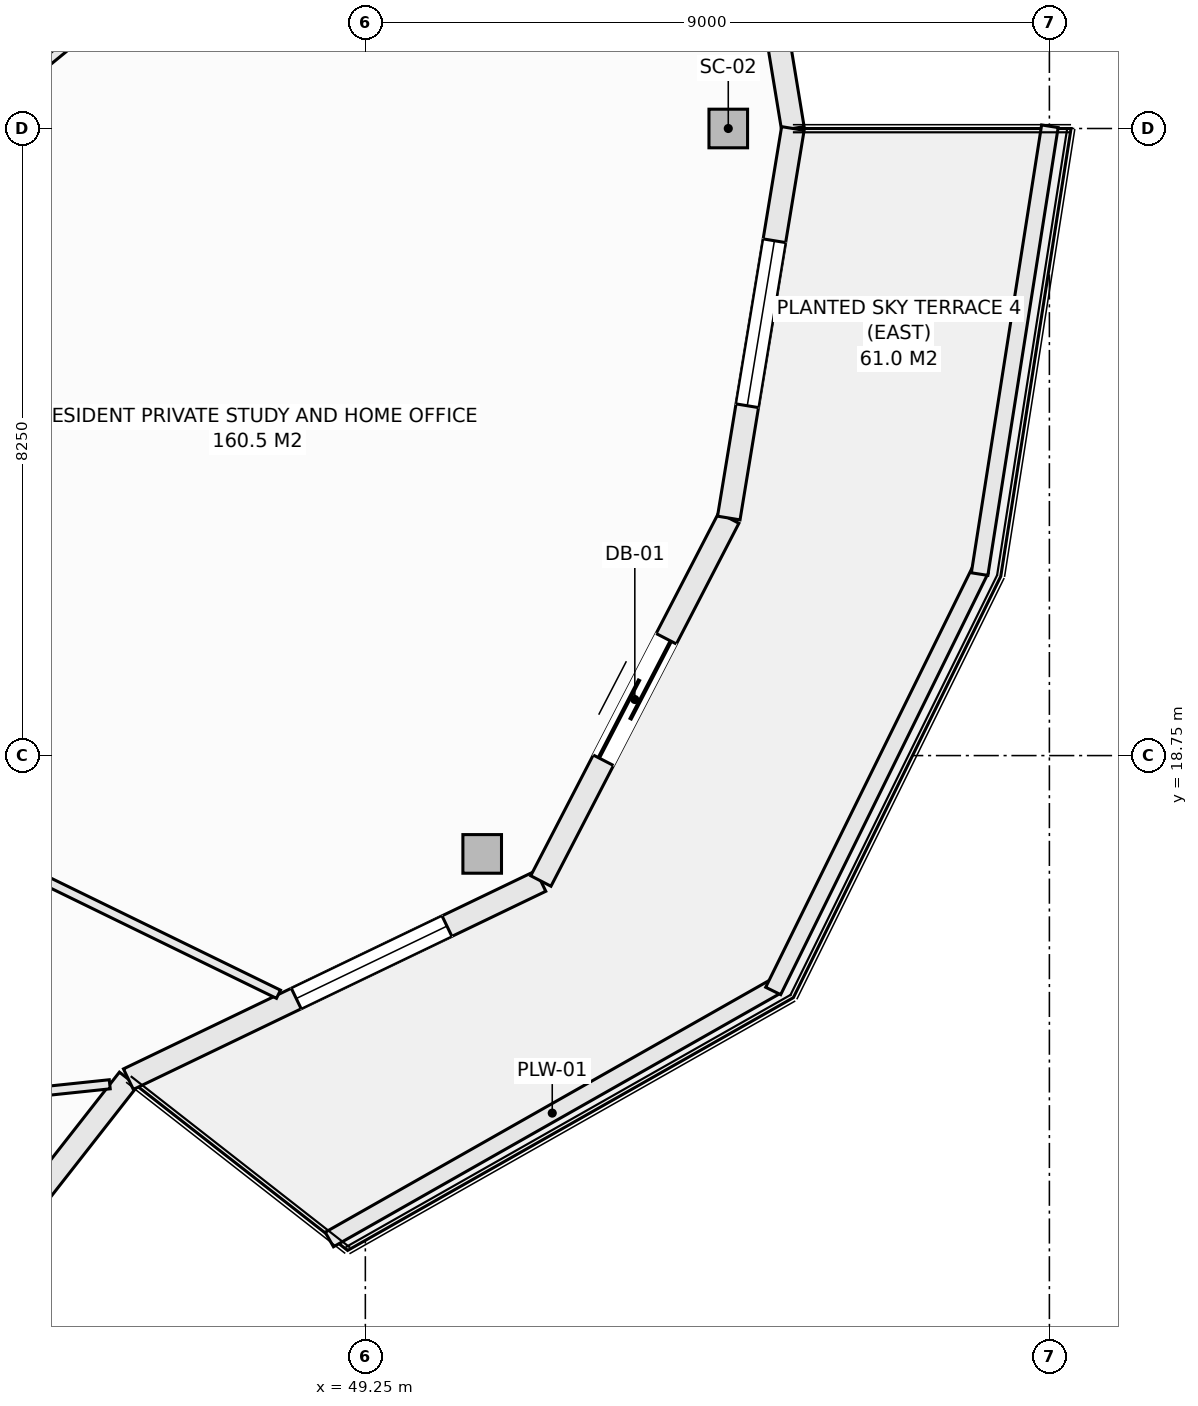
"""IFC4 building model, lengths in metres.
Left out: names, types, materials, properties, quantities, classifications, styles, units other than length and angle.
Written with IfcOpenShell. Run it as: python <this file> out.ifc"""

import sys

from ifc_helpers import new_model, si_unit, direction, frame, frame_2d, origin, origin_2d, place, context, subcontext, project, spatial, rectangle, hollow_rectangle, extrude, element, fill, save


model = new_model("IFC4")
c1 = context("Model", 3, precision=1e-05, world=origin(), true_north=direction((0.0, 1.0)))
c2 = subcontext(c1, "Body", "Model", "MODEL_VIEW")
j1 = project(units=[si_unit("LENGTHUNIT", "METRE"), si_unit("PLANEANGLEUNIT", "RADIAN")], contexts=[c1])
p1 = place(None, origin())
s1 = spatial("IfcSite", under=j1, at=p1, CompositionType="ELEMENT")
p2 = place(p1, origin())
s2 = spatial("IfcBuilding", under=s1, at=p2, CompositionType="ELEMENT")
p3 = place(p2, frame((0.0, 0.0, 216.2)))
s3 = spatial("IfcBuildingStorey", under=s2, at=p3, CompositionType="ELEMENT", Elevation=216.2)
for number, where, z_axis, x_axis in (
    (1, (54.025, 27.0, -0.27), (0.0, 0.0, 1.0), (1.0, 0.0, 0.0)),
    (2, (50.787, 17.456, -0.27), (0.0, 0.0, 1.0), (1.0, 0.0, 0.0)),
):
    element("IfcColumn", number, at=place(p3, frame(where, z_axis=z_axis, x_axis=x_axis)), inside=s3, PredefinedType="COLUMN", context=c2, shape_type="SweptSolid", body=[
        extrude(hollow_rectangle(XDim=0.508, YDim=0.508, WallThickness=0.019, at=origin_2d()), origin(), (0.0, 0.0, 1.0), 3.3),
    ])
p4 = place(p3, frame((54.032, 32.125, 0.0), z_axis=(0.0, 0.0, 1.0), x_axis=(0.16237087798, -0.986729799886, 0.0)))
e3 = element("IfcWall", 3, at=p4, inside=s3, PredefinedType="SOLIDWALL", context=c2, shape_type="SweptSolid", body=[
    extrude(rectangle(XDim=5.193, YDim=0.3, at=frame_2d((2.597, 0.0))), origin(), (0.0, 0.0, 1.0), 2.605),
])
p5 = place(p4, frame((1.497, 0.0, 0.72)))
e4 = element("IfcOpeningElement", 4, at=p5, cuts=e3, PredefinedType="OPENING", context=c2, shape_type="SweptSolid", body=[
    extrude(rectangle(XDim=2.2, YDim=1.65, at=frame_2d((1.1, 0.825))), frame((0.0, 0.16, 0.0), z_axis=(0.0, -1.0, 0.0), x_axis=(1.0, 0.0, 0.0)), (0.0, 0.0, 1.0), 0.32),
])
p6 = place(p3, frame((42.5, 9.853, 0.0), z_axis=(0.0, 0.0, 1.0), x_axis=(0.616450126935, 0.787393955401, 0.0)))
e5 = element("IfcWall", 5, at=p6, inside=s3, PredefinedType="SOLIDWALL", context=c2, shape_type="SweptSolid", body=[
    extrude(rectangle(XDim=5.893, YDim=0.3, at=frame_2d((2.946, 0.0))), origin(), (0.0, 0.0, 1.0), 2.605),
])
p7 = place(p6, frame((1.846, 0.0, 0.72)))
e6 = element("IfcOpeningElement", 6, at=p7, cuts=e5, PredefinedType="OPENING", context=c2, shape_type="SweptSolid", body=[
    extrude(rectangle(XDim=2.2, YDim=1.65, at=frame_2d((1.1, 0.825))), frame((0.0, 0.16, 0.0), z_axis=(0.0, -1.0, 0.0), x_axis=(1.0, 0.0, 0.0)), (0.0, 0.0, 1.0), 0.32),
])
p8 = place(p3, frame((46.133, 14.493, 0.0), z_axis=(0.0, 0.0, 1.0), x_axis=(0.901348331142, 0.433094892545, 0.0)))
e7 = element("IfcWall", 7, at=p8, inside=s3, PredefinedType="SOLIDWALL", context=c2, shape_type="SweptSolid", body=[
    extrude(rectangle(XDim=6.021, YDim=0.3, at=frame_2d((3.01, 0.0))), origin(), (0.0, 0.0, 1.0), 2.605),
])
p9 = place(p8, frame((2.45, 0.0, 0.72)))
e8 = element("IfcOpeningElement", 8, at=p9, cuts=e7, PredefinedType="OPENING", context=c2, shape_type="SweptSolid", body=[
    extrude(rectangle(XDim=2.2, YDim=1.65, at=frame_2d((1.1, 0.825))), frame((0.0, 0.16, 0.0), z_axis=(0.0, -1.0, 0.0), x_axis=(1.0, 0.0, 0.0)), (0.0, 0.0, 1.0), 0.32),
])
p10 = place(p3, frame((51.559, 17.1, 0.0), z_axis=(0.0, 0.0, 1.0), x_axis=(0.459808219482, 0.888018243786, 0.0)))
e9 = element("IfcWall", 9, at=p10, inside=s3, PredefinedType="SOLIDWALL", context=c2, shape_type="SweptSolid", body=[
    extrude(rectangle(XDim=5.378, YDim=0.3, at=frame_2d((2.689, 0.0))), origin(), (0.0, 0.0, 1.0), 2.605),
])
p11 = place(p10, frame((1.789, 0.0, 0.0)))
e10 = element("IfcOpeningElement", 10, at=p11, cuts=e9, PredefinedType="OPENING", context=c2, shape_type="SweptSolid", body=[
    extrude(rectangle(XDim=1.8, YDim=2.25, at=frame_2d((0.9, 1.125))), frame((0.0, 0.16, 0.0), z_axis=(0.0, -1.0, 0.0), x_axis=(1.0, 0.0, 0.0)), (0.0, 0.0, 1.0), 0.32),
])
p12 = place(p3, frame((54.032, 21.875, 0.0), z_axis=(0.0, 0.0, 1.0), x_axis=(0.16237087798, 0.986729799886, 0.0)))
e11 = element("IfcWall", 11, at=p12, inside=s3, PredefinedType="SOLIDWALL", context=c2, shape_type="SweptSolid", body=[
    extrude(rectangle(XDim=5.193, YDim=0.3, at=frame_2d((2.597, 0.0))), origin(), (0.0, 0.0, 1.0), 2.605),
])
p13 = place(p12, frame((1.497, 0.0, 0.72)))
e12 = element("IfcOpeningElement", 12, at=p13, cuts=e11, PredefinedType="OPENING", context=c2, shape_type="SweptSolid", body=[
    extrude(rectangle(XDim=2.2, YDim=1.65, at=frame_2d((1.1, 0.825))), frame((0.0, 0.16, 0.0), z_axis=(0.0, -1.0, 0.0), x_axis=(1.0, 0.0, 0.0)), (0.0, 0.0, 1.0), 0.32),
])
p14 = place(p3, frame((48.776, 12.383, 0.0), z_axis=(0.0, 0.0, 1.0), x_axis=(0.869860619267, 0.493297580623, 0.0)))
e13 = element("IfcWall", 13, at=p14, inside=s3, PredefinedType="PARAPET", context=c2, shape_type="SweptSolid", body=[
    extrude(rectangle(XDim=6.743, YDim=0.22, at=frame_2d((3.371, 0.0))), origin(), (0.0, 0.0, 1.0), 0.52),
])
p15 = place(p3, frame((54.616, 15.653, 0.0), z_axis=(0.0, 0.0, 1.0), x_axis=(0.441640961804, 0.897191875162, 0.0)))
e14 = element("IfcWall", 14, at=p15, inside=s3, PredefinedType="PARAPET", context=c2, shape_type="SweptSolid", body=[
    extrude(rectangle(XDim=6.178, YDim=0.22, at=frame_2d((3.089, 0.0))), origin(), (0.0, 0.0, 1.0), 0.52),
])
p16 = place(p3, frame((57.332, 21.138, 0.0), z_axis=(0.0, 0.0, 1.0), x_axis=(0.1550711793, 0.987903299595, 0.0)))
e15 = element("IfcWall", 15, at=p16, inside=s3, PredefinedType="PARAPET", context=c2, shape_type="SweptSolid", body=[
    extrude(rectangle(XDim=5.964, YDim=0.22, at=frame_2d((2.982, 0.0))), origin(), (0.0, 0.0, 1.0), 0.52),
])
p17 = place(p3, frame((41.582, 25.032, 0.0), z_axis=(0.0, 0.0, 1.0), x_axis=(0.773716066315, 0.633532515919, 0.0)))
e16 = element("IfcWall", 16, at=p17, inside=s3, PredefinedType="PARTITIONING", context=c2, shape_type="SweptSolid", body=[
    extrude(rectangle(XDim=14.478, YDim=0.12, at=frame_2d((7.239, 0.0))), origin(), (0.0, 0.0, 1.0), 2.478),
])
p18 = place(p3, frame((36.012, 13.388, 0.0), z_axis=(0.0, 0.0, 1.0), x_axis=(0.994530215, 0.104449276931, 0.0)))
e17 = element("IfcWall", 17, at=p18, inside=s3, PredefinedType="PARTITIONING", context=c2, shape_type="SweptSolid", body=[
    extrude(rectangle(XDim=9.929, YDim=0.12, at=frame_2d((4.965, 0.0))), origin(), (0.0, 0.0, 1.0), 3.03),
])
p19 = place(p3, frame((44.078, 17.576, 0.0), z_axis=(0.0, 0.0, 1.0), x_axis=(0.898720286075, -0.438522345381, 0.0)))
e18 = element("IfcWall", 18, at=p19, inside=s3, PredefinedType="PARTITIONING", context=c2, shape_type="SweptSolid", body=[
    extrude(rectangle(XDim=4.483, YDim=0.12, at=frame_2d((2.241, 0.0))), origin(), (0.0, 0.0, 1.0), 3.03),
])
p20 = place(p9, origin())
e19 = element("IfcWindow", 19, at=p20, inside=s3, PartitioningType="SINGLE_PANEL", PredefinedType="WINDOW", context=c2, shape_type="SweptSolid", body=[
    extrude(rectangle(XDim=2.2, YDim=1.65, at=frame_2d((1.1, 0.825))), frame((0.0, 0.03, 0.0), z_axis=(0.0, -1.0, 0.0), x_axis=(1.0, 0.0, 0.0)), (0.0, 0.0, 1.0), 0.06),
])
fill(e8, e19)
p21 = place(p11, frame((1.8, 0.0, 0.0), z_axis=(0.0, 0.0, 1.0), x_axis=(-1.0, 0.0, 0.0)))
e20 = element("IfcDoor", 20, at=p21, inside=s3, OperationType="SLIDING_TO_LEFT", PredefinedType="DOOR", context=c2, shape_type="SweptSolid", body=[
    extrude(rectangle(XDim=1.8, YDim=2.25, at=frame_2d((0.9, 1.125))), frame((0.0, 0.025, 0.0), z_axis=(0.0, -1.0, 0.0), x_axis=(1.0, 0.0, 0.0)), (0.0, 0.0, 1.0), 0.05),
])
fill(e10, e20)
p22 = place(p13, origin())
e21 = element("IfcWindow", 21, at=p22, inside=s3, PartitioningType="SINGLE_PANEL", PredefinedType="WINDOW", context=c2, shape_type="SweptSolid", body=[
    extrude(rectangle(XDim=2.2, YDim=1.65, at=frame_2d((1.1, 0.825))), frame((0.0, 0.03, 0.0), z_axis=(0.0, -1.0, 0.0), x_axis=(1.0, 0.0, 0.0)), (0.0, 0.0, 1.0), 0.06),
])
fill(e12, e21)
save(model, sys.argv[1])
